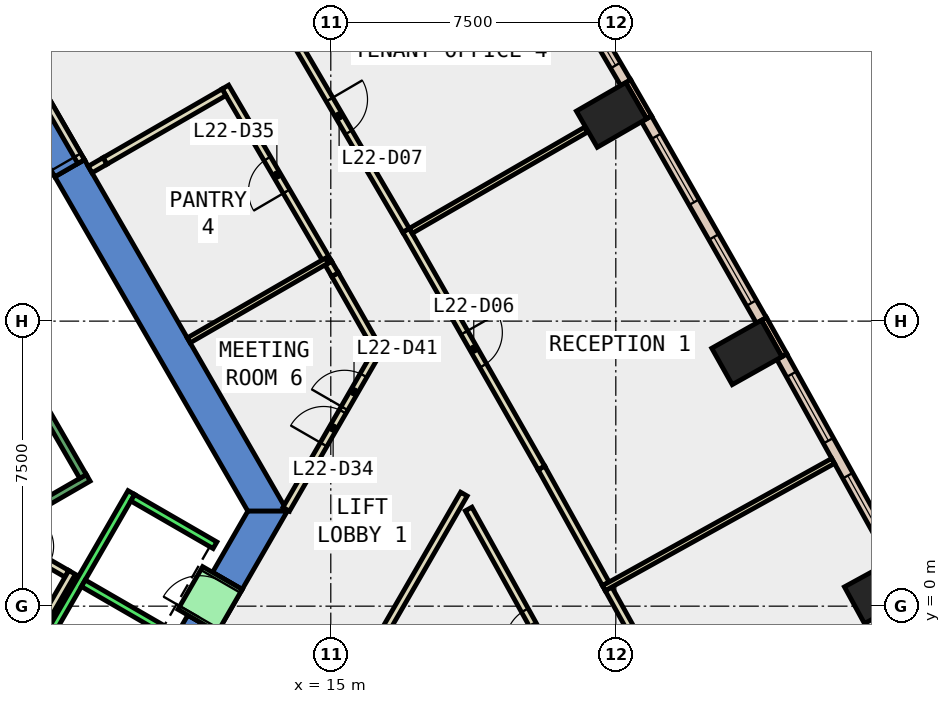
"""IFC4 building model, lengths in metres.
Left out: names, types, materials, properties, quantities, classifications, styles, units other than length and angle.
Written with IfcOpenShell. Run it as: python <this file> out.ifc"""

import sys

from ifc_helpers import new_model, si_unit, direction, frame, frame_2d, origin, origin_2d, place, context, subcontext, project, spatial, polyline, rectangle, outline, extrude, element, fill, save


model = new_model("IFC4")
c1 = context("Model", 3, precision=1e-05, world=origin(), true_north=direction((0.0, 1.0)))
c2 = subcontext(c1, "Body", "Model", "MODEL_VIEW")
j1 = project(units=[si_unit("LENGTHUNIT", "METRE"), si_unit("PLANEANGLEUNIT", "RADIAN")], contexts=[c1])
p1 = place(None, origin())
s1 = spatial("IfcSite", under=j1, at=p1, CompositionType="ELEMENT")
p2 = place(p1, origin())
s2 = spatial("IfcBuilding", under=s1, at=p2, CompositionType="ELEMENT")
p3 = place(p2, frame((0.0, 0.0, 103.4)))
s3 = spatial("IfcBuildingStorey", under=s2, at=p3, CompositionType="ELEMENT", Elevation=103.4)
for number, where, z_axis, x_axis in (
    (1, (29.438, 0.385, -0.4), (0.0, 0.0, 1.0), (-0.48, 0.877, 0.0)),
    (2, (25.948, 6.675, -0.4), (0.0, 0.0, 1.0), (-0.49, 0.872, 0.0)),
    (3, (22.387, 12.925, -0.4), (0.0, 0.0, 1.0), (-0.5, 0.866, 0.0)),
):
    element("IfcColumn", number, at=place(p3, frame(where, z_axis=z_axis, x_axis=x_axis)), inside=s3, PredefinedType="COLUMN", context=c2, shape_type="SweptSolid", body=[
        extrude(rectangle(XDim=1.1, YDim=1.5, at=origin_2d()), origin(), (0.0, 0.0, 1.0), 4.2),
    ])
p4 = place(p3, frame((0.0, 0.0, -0.4)))
e4 = element("IfcWall", 4, at=p4, inside=s3, PredefinedType="SHEAR", context=c2, shape_type="SweptSolid", body=[
    extrude(outline(polyline([(8.517, 11.748), (7.738, 11.298), (12.817, 2.5), (13.856, 2.5), (8.517, 11.748)])), origin(), (0.0, 0.0, 1.0), 4.2),
])
p5 = place(p3, frame((0.0, 0.0, 3.6)))
e5 = element("IfcWall", 5, at=p5, inside=s3, PredefinedType="SHEAR", context=c2, shape_type="SweptSolid", body=[
    extrude(outline(polyline([(7.517, 13.48), (6.738, 13.03), (7.738, 11.298), (8.517, 11.748), (7.517, 13.48)])), origin(), (0.0, 0.0, 1.0), 0.2),
])
p6 = place(p3, frame((0.0, 0.0, -0.4)))
e6 = element("IfcWall", 6, at=p6, inside=s3, PredefinedType="SHEAR", context=c2, shape_type="SweptSolid", body=[
    extrude(outline(polyline([(12.017, -0.686), (11.238, -0.236), (10.588, -1.361), (11.367, -1.811), (12.017, -0.686)])), origin(), (0.0, 0.0, 1.0), 4.2),
])
p7 = place(p3, frame((0.0, 0.0, -0.4)))
e7 = element("IfcWall", 7, at=p7, inside=s3, PredefinedType="SHEAR", context=c2, shape_type="SweptSolid", body=[
    extrude(outline(polyline([(11.888, 0.89), (12.667, 0.44), (13.856, 2.5), (12.817, 2.5), (11.888, 0.89)])), origin(), (0.0, 0.0, 1.0), 4.2),
])
p8 = place(p3, frame((0.0, 0.0, 3.6)))
e8 = element("IfcWall", 8, at=p8, inside=s3, PredefinedType="SHEAR", context=c2, shape_type="SweptSolid", body=[
    extrude(outline(polyline([(12.667, 0.44), (11.888, 0.89), (11.238, -0.236), (12.017, -0.686), (12.667, 0.44)])), origin(), (0.0, 0.0, 1.0), 0.2),
])
p9 = place(p3, frame((26.937, 6.6, 0.0), z_axis=(0.0, 0.0, 1.0), x_axis=(-0.490008344094, 0.871717742574, 0.0)))
e9 = element("IfcWall", 9, at=p9, inside=s3, PredefinedType="STANDARD", context=c2, shape_type="SweptSolid", body=[
    extrude(rectangle(XDim=1.1, YDim=0.15, at=frame_2d((0.55, 0.0))), origin(), (0.0, 0.0, 1.0), 3.8),
])
p10 = place(p3, frame((23.376, 12.861, 0.0), z_axis=(0.0, 0.0, 1.0), x_axis=(-0.499933745558, 0.866063652425, 0.0)))
e10 = element("IfcWall", 10, at=p10, inside=s3, PredefinedType="STANDARD", context=c2, shape_type="SweptSolid", body=[
    extrude(rectangle(XDim=1.1, YDim=0.15, at=frame_2d((0.55, 0.0))), origin(), (0.0, 0.0, 1.0), 3.8),
])
p11 = place(p3, frame((29.83, 1.225, 0.0), z_axis=(0.0, 0.0, 1.0), x_axis=(-0.485170774404, 0.874419418623, 0.0)))
e11 = element("IfcWall", 11, at=p11, inside=s3, PredefinedType="STANDARD", context=c2, shape_type="SweptSolid", body=[
    extrude(rectangle(XDim=6.103, YDim=0.3, at=frame_2d((3.052, 0.0))), origin(), (0.0, 0.0, 1.0), 3.8),
])
p12 = place(p11, frame((0.526, 0.0, 0.9)))
e12 = element("IfcOpeningElement", 12, at=p12, cuts=e11, PredefinedType="OPENING", context=c2, shape_type="SweptSolid", body=[
    extrude(rectangle(XDim=2.0, YDim=2.6, at=frame_2d((1.0, 1.3))), frame((0.0, 0.16, 0.0), z_axis=(0.0, -1.0, 0.0), x_axis=(1.0, 0.0, 0.0)), (0.0, 0.0, 1.0), 0.32),
])
p13 = place(p11, frame((3.578, 0.0, 0.9)))
e13 = element("IfcOpeningElement", 13, at=p13, cuts=e11, PredefinedType="OPENING", context=c2, shape_type="SweptSolid", body=[
    extrude(rectangle(XDim=2.0, YDim=2.6, at=frame_2d((1.0, 1.3))), frame((0.0, 0.16, 0.0), z_axis=(0.0, -1.0, 0.0), x_axis=(1.0, 0.0, 0.0)), (0.0, 0.0, 1.0), 0.32),
])
p14 = place(p3, frame((26.33, 7.52, 0.0), z_axis=(0.0, 0.0, 1.0), x_axis=(-0.495113375427, 0.868828375154, 0.0)))
e14 = element("IfcWall", 14, at=p14, inside=s3, PredefinedType="STANDARD", context=c2, shape_type="SweptSolid", body=[
    extrude(rectangle(XDim=6.104, YDim=0.3, at=frame_2d((3.052, 0.0))), origin(), (0.0, 0.0, 1.0), 3.8),
])
p15 = place(p14, frame((0.526, 0.0, 0.9)))
e15 = element("IfcOpeningElement", 15, at=p15, cuts=e14, PredefinedType="OPENING", context=c2, shape_type="SweptSolid", body=[
    extrude(rectangle(XDim=2.0, YDim=2.6, at=frame_2d((1.0, 1.3))), frame((0.0, 0.16, 0.0), z_axis=(0.0, -1.0, 0.0), x_axis=(1.0, 0.0, 0.0)), (0.0, 0.0, 1.0), 0.32),
])
p16 = place(p14, frame((3.578, 0.0, 0.9)))
e16 = element("IfcOpeningElement", 16, at=p16, cuts=e14, PredefinedType="OPENING", context=c2, shape_type="SweptSolid", body=[
    extrude(rectangle(XDim=2.0, YDim=2.6, at=frame_2d((1.0, 1.3))), frame((0.0, 0.16, 0.0), z_axis=(0.0, -1.0, 0.0), x_axis=(1.0, 0.0, 0.0)), (0.0, 0.0, 1.0), 0.32),
])
p17 = place(p3, frame((22.759, 13.774, 0.0), z_axis=(0.0, 0.0, 1.0), x_axis=(-0.50490018297, 0.863177736759, 0.0)))
e17 = element("IfcWall", 17, at=p17, inside=s3, PredefinedType="STANDARD", context=c2, shape_type="SweptSolid", body=[
    extrude(rectangle(XDim=6.104, YDim=0.3, at=frame_2d((3.052, 0.0))), origin(), (0.0, 0.0, 1.0), 3.8),
])
p18 = place(p17, frame((0.526, 0.0, 0.9)))
e18 = element("IfcOpeningElement", 18, at=p18, cuts=e17, PredefinedType="OPENING", context=c2, shape_type="SweptSolid", body=[
    extrude(rectangle(XDim=2.0, YDim=2.6, at=frame_2d((1.0, 1.3))), frame((0.0, 0.16, 0.0), z_axis=(0.0, -1.0, 0.0), x_axis=(1.0, 0.0, 0.0)), (0.0, 0.0, 1.0), 0.32),
])
p19 = place(p17, frame((3.578, 0.0, 0.9)))
e19 = element("IfcOpeningElement", 19, at=p19, cuts=e17, PredefinedType="OPENING", context=c2, shape_type="SweptSolid", body=[
    extrude(rectangle(XDim=2.0, YDim=2.6, at=frame_2d((1.0, 1.3))), frame((0.0, 0.16, 0.0), z_axis=(0.0, -1.0, 0.0), x_axis=(1.0, 0.0, 0.0)), (0.0, 0.0, 1.0), 0.32),
])
p20 = place(p3, frame((16.195, 6.824, 0.0), z_axis=(0.0, 0.0, 1.0), x_axis=(-0.494984897559, 0.868901577388, 0.0)))
e20 = element("IfcWall", 20, at=p20, inside=s3, PredefinedType="PARTITIONING", context=c2, shape_type="SweptSolid", body=[
    extrude(rectangle(XDim=2.188, YDim=0.2, at=frame_2d((1.094, 0.0))), origin(), (0.0, 0.0, 1.0), 3.8),
])
p21 = place(p3, frame((15.112, 8.725, 0.0), z_axis=(0.0, 0.0, 1.0), x_axis=(-0.50443330283, 0.86345066043, 0.0)))
e21 = element("IfcWall", 21, at=p21, inside=s3, PredefinedType="PARTITIONING", context=c2, shape_type="SweptSolid", body=[
    extrude(rectangle(XDim=0.351, YDim=0.2, at=frame_2d((0.175, 0.0))), origin(), (0.0, 0.0, 1.0), 3.8),
])
p22 = place(p3, frame((14.935, 9.028, 0.0), z_axis=(0.0, 0.0, 1.0), x_axis=(-0.504934493304, 0.863157666636, 0.0)))
e22 = element("IfcWall", 22, at=p22, inside=s3, PredefinedType="PARTITIONING", context=c2, shape_type="SweptSolid", body=[
    extrude(rectangle(XDim=5.365, YDim=0.2, at=frame_2d((2.683, 0.0))), origin(), (0.0, 0.0, 1.0), 3.8),
])
p23 = place(p22, frame((2.182, 0.0, 0.0)))
e23 = element("IfcOpeningElement", 23, at=p23, cuts=e22, PredefinedType="OPENING", context=c2, shape_type="SweptSolid", body=[
    extrude(rectangle(XDim=1.0, YDim=2.1, at=frame_2d((0.5, 1.05))), frame((0.0, 0.11, 0.0), z_axis=(0.0, -1.0, 0.0), x_axis=(1.0, 0.0, 0.0)), (0.0, 0.0, 1.0), 0.22),
])
p24 = place(p3, frame((12.19, 13.522, 0.0), z_axis=(0.0, 0.0, 1.0), x_axis=(-0.866000156139, -0.500043727655, 0.0)))
e24 = element("IfcWall", 24, at=p24, inside=s3, PredefinedType="PARTITIONING", context=c2, shape_type="SweptSolid", body=[
    extrude(rectangle(XDim=3.618, YDim=0.2, at=frame_2d((1.809, 0.0))), origin(), (0.0, 0.0, 1.0), 3.8),
])
p25 = place(p3, frame((22.071, -3.65, 0.0), z_axis=(0.0, 0.0, 1.0), x_axis=(-0.485198988697, 0.874403763354, 0.0)))
e25 = element("IfcWall", 25, at=p25, inside=s3, PredefinedType="PARTITIONING", context=c2, shape_type="SweptSolid", body=[
    extrude(rectangle(XDim=7.098, YDim=0.2, at=frame_2d((3.549, 0.0))), origin(), (0.0, 0.0, 1.0), 3.8),
])
p26 = place(p25, frame((3.049, 0.0, 0.0)))
e26 = element("IfcOpeningElement", 26, at=p26, cuts=e25, PredefinedType="OPENING", context=c2, shape_type="SweptSolid", body=[
    extrude(rectangle(XDim=1.0, YDim=2.1, at=frame_2d((0.5, 1.05))), frame((0.0, 0.11, 0.0), z_axis=(0.0, -1.0, 0.0), x_axis=(1.0, 0.0, 0.0)), (0.0, 0.0, 1.0), 0.22),
])
p27 = place(p3, frame((22.309, 0.456, 0.0), z_axis=(0.0, 0.0, 1.0), x_axis=(0.484982854201, -0.87452365956, 0.0)))
e27 = element("IfcWall", 27, at=p27, inside=s3, PredefinedType="PARTITIONING", context=c2, shape_type="SweptSolid", body=[
    extrude(rectangle(XDim=3.487, YDim=0.2, at=frame_2d((1.743, 0.0))), origin(), (0.0, 0.0, 1.0), 3.8),
])
p28 = place(p3, frame((16.98, 9.89, 0.0), z_axis=(0.0, 0.0, 1.0), x_axis=(0.495123170501, -0.868822793228, 0.0)))
e28 = element("IfcWall", 28, at=p28, inside=s3, PredefinedType="PARTITIONING", context=c2, shape_type="SweptSolid", body=[
    extrude(rectangle(XDim=7.198, YDim=0.2, at=frame_2d((3.599, 0.0))), origin(), (0.0, 0.0, 1.0), 3.8),
])
p29 = place(p28, frame((3.099, 0.0, 0.0)))
e29 = element("IfcOpeningElement", 29, at=p29, cuts=e28, PredefinedType="OPENING", context=c2, shape_type="SweptSolid", body=[
    extrude(rectangle(XDim=1.0, YDim=2.1, at=frame_2d((0.5, 1.05))), frame((0.0, 0.11, 0.0), z_axis=(0.0, -1.0, 0.0), x_axis=(1.0, 0.0, 0.0)), (0.0, 0.0, 1.0), 0.22),
])
p30 = place(p3, frame((20.544, 3.636, 0.0), z_axis=(0.0, 0.0, 1.0), x_axis=(0.485250552989, -0.874375148792, 0.0)))
e30 = element("IfcWall", 30, at=p30, inside=s3, PredefinedType="PARTITIONING", context=c2, shape_type="SweptSolid", body=[
    extrude(rectangle(XDim=3.487, YDim=0.2, at=frame_2d((1.744, 0.0))), origin(), (0.0, 0.0, 1.0), 3.8),
])
p31 = place(p3, frame((13.383, 16.039, 0.0), z_axis=(0.0, 0.0, 1.0), x_axis=(0.504806221623, -0.863232690884, 0.0)))
e31 = element("IfcWall", 31, at=p31, inside=s3, PredefinedType="PARTITIONING", context=c2, shape_type="SweptSolid", body=[
    extrude(rectangle(XDim=7.124, YDim=0.2, at=frame_2d((3.562, 0.0))), origin(), (0.0, 0.0, 1.0), 3.8),
])
p32 = place(p31, frame((3.137, 0.0, 0.0)))
e32 = element("IfcOpeningElement", 32, at=p32, cuts=e31, PredefinedType="OPENING", context=c2, shape_type="SweptSolid", body=[
    extrude(rectangle(XDim=1.0, YDim=2.1, at=frame_2d((0.5, 1.05))), frame((0.0, 0.11, 0.0), z_axis=(0.0, -1.0, 0.0), x_axis=(1.0, 0.0, 0.0)), (0.0, 0.0, 1.0), 0.22),
])
p33 = place(p3, frame((6.25, 1.894, 0.0), z_axis=(0.0, 0.0, 1.0), x_axis=(0.866043184279, -0.499969202016, 0.0)))
e33 = element("IfcWall", 33, at=p33, inside=s3, PredefinedType="PARTITIONING", context=c2, shape_type="SweptSolid", body=[
    extrude(rectangle(XDim=2.084, YDim=0.2, at=frame_2d((1.042, 0.0))), origin(), (0.0, 0.0, 1.0), 3.8),
])
p34 = place(p33, frame((0.642, 0.0, 0.0)))
e34 = element("IfcOpeningElement", 34, at=p34, cuts=e33, PredefinedType="OPENING", context=c2, shape_type="SweptSolid", body=[
    extrude(rectangle(XDim=0.9, YDim=2.1, at=frame_2d((0.45, 1.05))), frame((0.0, 0.11, 0.0), z_axis=(0.0, -1.0, 0.0), x_axis=(1.0, 0.0, 0.0)), (0.0, 0.0, 1.0), 0.22),
])
p35 = place(p3, frame((8.192, 0.888, 0.0), z_axis=(0.0, 0.0, 1.0), x_axis=(-0.499940625693, -0.866059680843, 0.0)))
e35 = element("IfcWall", 35, at=p35, inside=s3, PredefinedType="PARTITIONING", context=c2, shape_type="SweptSolid", body=[
    extrude(rectangle(XDim=2.68, YDim=0.2, at=frame_2d((1.34, 0.0))), origin(), (0.0, 0.0, 1.0), 3.8),
])
p36 = place(p3, frame((11.261, 6.994, 0.0), z_axis=(0.0, 0.0, 1.0), x_axis=(0.866037428454, 0.499979172084, 0.0)))
e36 = element("IfcWall", 36, at=p36, inside=s3, PredefinedType="PARTITIONING", context=c2, shape_type="SweptSolid", body=[
    extrude(rectangle(XDim=4.198, YDim=0.15, at=frame_2d((2.099, 0.0))), origin(), (0.0, 0.0, 1.0), 3.8),
])
p37 = place(p3, frame((13.827, 2.55, 0.0), z_axis=(0.0, 0.0, 1.0), x_axis=(0.500070719615, 0.865984569946, 0.0)))
e37 = element("IfcWall", 37, at=p37, inside=s3, PredefinedType="PARTITIONING", context=c2, shape_type="SweptSolid", body=[
    extrude(rectangle(XDim=4.935, YDim=0.2, at=frame_2d((2.468, 0.0))), origin(), (0.0, 0.0, 1.0), 3.8),
])
p38 = place(p37, frame((1.968, 0.0, 0.0)))
e38 = element("IfcOpeningElement", 38, at=p38, cuts=e37, PredefinedType="OPENING", context=c2, shape_type="SweptSolid", body=[
    extrude(rectangle(XDim=1.0, YDim=2.1, at=frame_2d((0.5, 1.05))), frame((0.0, 0.11, 0.0), z_axis=(0.0, -1.0, 0.0), x_axis=(1.0, 0.0, 0.0)), (0.0, 0.0, 1.0), 0.22),
])
p39 = place(p37, frame((3.068, 0.0, 0.0)))
e39 = element("IfcOpeningElement", 39, at=p39, cuts=e37, PredefinedType="OPENING", context=c2, shape_type="SweptSolid", body=[
    extrude(rectangle(XDim=1.0, YDim=2.1, at=frame_2d((0.5, 1.05))), frame((0.0, 0.11, 0.0), z_axis=(0.0, -1.0, 0.0), x_axis=(1.0, 0.0, 0.0)), (0.0, 0.0, 1.0), 0.22),
])
p40 = place(p3, frame((18.503, 2.949, 0.0), z_axis=(0.0, 0.0, 1.0), x_axis=(-0.49997390151, -0.86604047123, 0.0)))
e40 = element("IfcWall", 40, at=p40, inside=s3, PredefinedType="PARTITIONING", context=c2, shape_type="SweptSolid", body=[
    extrude(rectangle(XDim=11.626, YDim=0.2, at=frame_2d((5.813, 0.0))), origin(), (0.0, 0.0, 1.0), 3.8),
])
p41 = place(p3, frame((22.185, 0.473, 0.0), z_axis=(0.0, 0.0, 1.0), x_axis=(0.874372498137, 0.485255329184, 0.0)))
e41 = element("IfcWall", 41, at=p41, inside=s3, PredefinedType="PARTITIONING", context=c2, shape_type="SweptSolid", body=[
    extrude(rectangle(XDim=6.9, YDim=0.15, at=frame_2d((3.45, 0.0))), origin(), (0.0, 0.0, 1.0), 3.8),
])
p42 = place(p3, frame((17.104, 9.875, 0.0), z_axis=(0.0, 0.0, 1.0), x_axis=(0.866024640963, 0.500001321243, 0.0)))
e42 = element("IfcWall", 42, at=p42, inside=s3, PredefinedType="PARTITIONING", context=c2, shape_type="SweptSolid", body=[
    extrude(rectangle(XDim=5.33, YDim=0.15, at=frame_2d((2.665, 0.0))), origin(), (0.0, 0.0, 1.0), 3.8),
])
p43 = place(p3, frame((8.43, 11.698, 0.0), z_axis=(0.0, 0.0, 1.0), x_axis=(-0.50002537861, 0.866010750942, 0.0)))
e43 = element("IfcWall", 43, at=p43, inside=s3, PredefinedType="PARTITIONING", context=c2, shape_type="SweptSolid", body=[
    extrude(rectangle(XDim=2.0, YDim=0.2, at=frame_2d((1.0, 0.0))), origin(), (0.0, 0.0, 1.0), 2.4),
])
p44 = place(p43, frame((0.19, 0.0, 0.0)))
e44 = element("IfcOpeningElement", 44, at=p44, cuts=e43, PredefinedType="OPENING", context=c2, shape_type="SweptSolid", body=[
    extrude(rectangle(XDim=1.8, YDim=2.1, at=frame_2d((0.9, 1.05))), frame((0.0, 0.11, 0.0), z_axis=(0.0, -1.0, 0.0), x_axis=(1.0, 0.0, 0.0)), (0.0, 0.0, 1.0), 0.22),
])
p45 = place(p3, frame((9.057, 11.713, 0.0), z_axis=(0.0, 0.0, 1.0), x_axis=(-0.866266849364, -0.49958157061, 0.0)))
e45 = element("IfcWall", 45, at=p45, inside=s3, PredefinedType="PARTITIONING", context=c2, shape_type="SweptSolid", body=[
    extrude(rectangle(XDim=0.45, YDim=0.2, at=frame_2d((0.225, 0.0))), origin(), (0.0, 0.0, 1.0), 2.4),
])
p46 = place(p3, frame((4.451, -6.19, 0.0), z_axis=(0.0, 0.0, 1.0), x_axis=(0.50000090737, 0.866024879913, 0.0)))
e46 = element("IfcWall", 46, at=p46, inside=s3, PredefinedType="STANDARD", context=c2, shape_type="SweptSolid", body=[
    extrude(rectangle(XDim=10.6, YDim=0.2, at=frame_2d((5.3, 0.0))), origin(), (0.0, 0.0, 1.0), 3.8),
])
p47 = place(p3, frame((8.488, 0.602, 0.0), z_axis=(0.0, 0.0, 1.0), x_axis=(0.866022959057, -0.500004234368, 0.0)))
e47 = element("IfcWall", 47, at=p47, inside=s3, PredefinedType="STANDARD", context=c2, shape_type="SweptSolid", body=[
    extrude(rectangle(XDim=2.5, YDim=0.2, at=frame_2d((1.25, 0.0))), origin(), (0.0, 0.0, 1.0), 3.8),
])
p48 = place(p3, frame((9.788, 2.853, 0.0), z_axis=(0.0, 0.0, 1.0), x_axis=(0.865998541277, -0.500046524342, 0.0)))
e48 = element("IfcWall", 48, at=p48, inside=s3, PredefinedType="STANDARD", context=c2, shape_type="SweptSolid", body=[
    extrude(rectangle(XDim=2.5, YDim=0.2, at=frame_2d((1.25, 0.0))), origin(), (0.0, 0.0, 1.0), 3.8),
])
p49 = place(p3, frame((11.498, -0.385, 0.0), z_axis=(0.0, 0.0, 1.0), x_axis=(0.500221244143, 0.865897630733, 0.0)))
e49 = element("IfcWall", 49, at=p49, inside=s3, PredefinedType="STANDARD", context=c2, shape_type="SweptSolid", body=[
    extrude(rectangle(XDim=1.299, YDim=1.2, at=frame_2d((0.65, 0.0))), origin(), (0.0, 0.0, 1.0), 2.4),
])
p50 = place(p49, frame((0.1, 0.0, 0.0)))
e50 = element("IfcOpeningElement", 50, at=p50, cuts=e49, PredefinedType="OPENING", context=c2, shape_type="SweptSolid", body=[
    extrude(rectangle(XDim=1.1, YDim=2.3, at=frame_2d((0.55, 1.15))), frame((0.0, 0.61, 0.0), z_axis=(0.0, -1.0, 0.0), x_axis=(1.0, 0.0, 0.0)), (0.0, 0.0, 1.0), 1.22),
])
p51 = place(p3, frame((4.806, 1.176, 0.0), z_axis=(0.0, 0.0, 1.0), x_axis=(0.866059941101, 0.499940174841, 0.0)))
e51 = element("IfcWall", 51, at=p51, inside=s3, PredefinedType="STANDARD", context=c2, shape_type="SweptSolid", body=[
    extrude(rectangle(XDim=4.4, YDim=0.2, at=frame_2d((2.2, 0.0))), origin(), (0.0, 0.0, 1.0), 3.8),
])
p52 = place(p51, frame((1.65, 0.0, 0.0)))
e52 = element("IfcOpeningElement", 52, at=p52, cuts=e51, PredefinedType="OPENING", context=c2, shape_type="SweptSolid", body=[
    extrude(rectangle(XDim=1.1, YDim=2.2, at=frame_2d((0.55, 1.1))), frame((0.0, 0.11, 0.0), z_axis=(0.0, -1.0, 0.0), x_axis=(1.0, 0.0, 0.0)), (0.0, 0.0, 1.0), 0.22),
])
p53 = place(p3, frame((8.48, 3.412, 0.0), z_axis=(0.0, 0.0, 1.0), x_axis=(-0.499978703459, 0.866037698999, 0.0)))
e53 = element("IfcWall", 53, at=p53, inside=s3, PredefinedType="STANDARD", context=c2, shape_type="SweptSolid", body=[
    extrude(rectangle(XDim=6.9, YDim=0.2, at=frame_2d((3.45, 0.0))), origin(), (0.0, 0.0, 1.0), 3.8),
])
p54 = place(p12, origin())
e54 = element("IfcWindow", 54, at=p54, inside=s3, PartitioningType="SINGLE_PANEL", PredefinedType="WINDOW", context=c2, shape_type="SweptSolid", body=[
    extrude(rectangle(XDim=2.0, YDim=2.6, at=frame_2d((1.0, 1.3))), frame((0.0, 0.03, 0.0), z_axis=(0.0, -1.0, 0.0), x_axis=(1.0, 0.0, 0.0)), (0.0, 0.0, 1.0), 0.06),
])
fill(e12, e54)
p55 = place(p13, origin())
e55 = element("IfcWindow", 55, at=p55, inside=s3, PartitioningType="SINGLE_PANEL", PredefinedType="WINDOW", context=c2, shape_type="SweptSolid", body=[
    extrude(rectangle(XDim=2.0, YDim=2.6, at=frame_2d((1.0, 1.3))), frame((0.0, 0.03, 0.0), z_axis=(0.0, -1.0, 0.0), x_axis=(1.0, 0.0, 0.0)), (0.0, 0.0, 1.0), 0.06),
])
fill(e13, e55)
p56 = place(p15, origin())
e56 = element("IfcWindow", 56, at=p56, inside=s3, PartitioningType="SINGLE_PANEL", PredefinedType="WINDOW", context=c2, shape_type="SweptSolid", body=[
    extrude(rectangle(XDim=2.0, YDim=2.6, at=frame_2d((1.0, 1.3))), frame((0.0, 0.03, 0.0), z_axis=(0.0, -1.0, 0.0), x_axis=(1.0, 0.0, 0.0)), (0.0, 0.0, 1.0), 0.06),
])
fill(e15, e56)
p57 = place(p16, origin())
e57 = element("IfcWindow", 57, at=p57, inside=s3, PartitioningType="SINGLE_PANEL", PredefinedType="WINDOW", context=c2, shape_type="SweptSolid", body=[
    extrude(rectangle(XDim=2.0, YDim=2.6, at=frame_2d((1.0, 1.3))), frame((0.0, 0.03, 0.0), z_axis=(0.0, -1.0, 0.0), x_axis=(1.0, 0.0, 0.0)), (0.0, 0.0, 1.0), 0.06),
])
fill(e16, e57)
p58 = place(p18, origin())
e58 = element("IfcWindow", 58, at=p58, inside=s3, PartitioningType="SINGLE_PANEL", PredefinedType="WINDOW", context=c2, shape_type="SweptSolid", body=[
    extrude(rectangle(XDim=2.0, YDim=2.6, at=frame_2d((1.0, 1.3))), frame((0.0, 0.03, 0.0), z_axis=(0.0, -1.0, 0.0), x_axis=(1.0, 0.0, 0.0)), (0.0, 0.0, 1.0), 0.06),
])
fill(e18, e58)
p59 = place(p29, origin())
e59 = element("IfcDoor", 59, at=p59, inside=s3, OperationType="SINGLE_SWING_LEFT", PredefinedType="DOOR", context=c2, shape_type="SweptSolid", body=[
    extrude(rectangle(XDim=1.0, YDim=2.1, at=frame_2d((0.5, 1.05))), frame((0.0, 0.025, 0.0), z_axis=(0.0, -1.0, 0.0), x_axis=(1.0, 0.0, 0.0)), (0.0, 0.0, 1.0), 0.05),
])
fill(e29, e59)
p60 = place(p32, origin())
e60 = element("IfcDoor", 60, at=p60, inside=s3, OperationType="SINGLE_SWING_LEFT", PredefinedType="DOOR", context=c2, shape_type="SweptSolid", body=[
    extrude(rectangle(XDim=1.0, YDim=2.1, at=frame_2d((0.5, 1.05))), frame((0.0, 0.025, 0.0), z_axis=(0.0, -1.0, 0.0), x_axis=(1.0, 0.0, 0.0)), (0.0, 0.0, 1.0), 0.05),
])
fill(e32, e60)
p61 = place(p26, origin())
e61 = element("IfcDoor", 61, at=p61, inside=s3, OperationType="SINGLE_SWING_RIGHT", PredefinedType="DOOR", context=c2, shape_type="SweptSolid", body=[
    extrude(rectangle(XDim=1.0, YDim=2.1, at=frame_2d((0.5, 1.05))), frame((0.0, 0.025, 0.0), z_axis=(0.0, -1.0, 0.0), x_axis=(1.0, 0.0, 0.0)), (0.0, 0.0, 1.0), 0.05),
])
fill(e26, e61)
p62 = place(p38, origin())
e62 = element("IfcDoor", 62, at=p62, inside=s3, OperationType="SINGLE_SWING_LEFT", PredefinedType="DOOR", context=c2, shape_type="SweptSolid", body=[
    extrude(rectangle(XDim=1.0, YDim=2.1, at=frame_2d((0.5, 1.05))), frame((0.0, 0.025, 0.0), z_axis=(0.0, -1.0, 0.0), x_axis=(1.0, 0.0, 0.0)), (0.0, 0.0, 1.0), 0.05),
])
fill(e38, e62)
p63 = place(p23, origin())
e63 = element("IfcDoor", 63, at=p63, inside=s3, OperationType="SINGLE_SWING_LEFT", PredefinedType="DOOR", context=c2, shape_type="SweptSolid", body=[
    extrude(rectangle(XDim=1.0, YDim=2.1, at=frame_2d((0.5, 1.05))), frame((0.0, 0.025, 0.0), z_axis=(0.0, -1.0, 0.0), x_axis=(1.0, 0.0, 0.0)), (0.0, 0.0, 1.0), 0.05),
])
fill(e23, e63)
p64 = place(p39, origin())
e64 = element("IfcDoor", 64, at=p64, inside=s3, OperationType="SINGLE_SWING_RIGHT", PredefinedType="DOOR", context=c2, shape_type="SweptSolid", body=[
    extrude(rectangle(XDim=1.0, YDim=2.1, at=frame_2d((0.5, 1.05))), frame((0.0, 0.025, 0.0), z_axis=(0.0, -1.0, 0.0), x_axis=(1.0, 0.0, 0.0)), (0.0, 0.0, 1.0), 0.05),
])
fill(e39, e64)
p65 = place(p44, origin())
e65 = element("IfcDoor", 65, at=p65, inside=s3, OperationType="DOUBLE_DOOR_SINGLE_SWING", PredefinedType="DOOR", context=c2, shape_type="SweptSolid", body=[
    extrude(rectangle(XDim=1.8, YDim=2.1, at=frame_2d((0.9, 1.05))), frame((0.0, 0.025, 0.0), z_axis=(0.0, -1.0, 0.0), x_axis=(1.0, 0.0, 0.0)), (0.0, 0.0, 1.0), 0.05),
])
fill(e44, e65)
p66 = place(p50, origin())
e66 = element("IfcDoor", 66, at=p66, inside=s3, OperationType="SLIDING_TO_LEFT", PredefinedType="DOOR", context=c2, shape_type="SweptSolid", body=[
    extrude(rectangle(XDim=1.1, YDim=2.3, at=frame_2d((0.55, 1.15))), frame((0.0, 0.025, 0.0), z_axis=(0.0, -1.0, 0.0), x_axis=(1.0, 0.0, 0.0)), (0.0, 0.0, 1.0), 0.05),
])
fill(e50, e66)
save(model, sys.argv[1])
